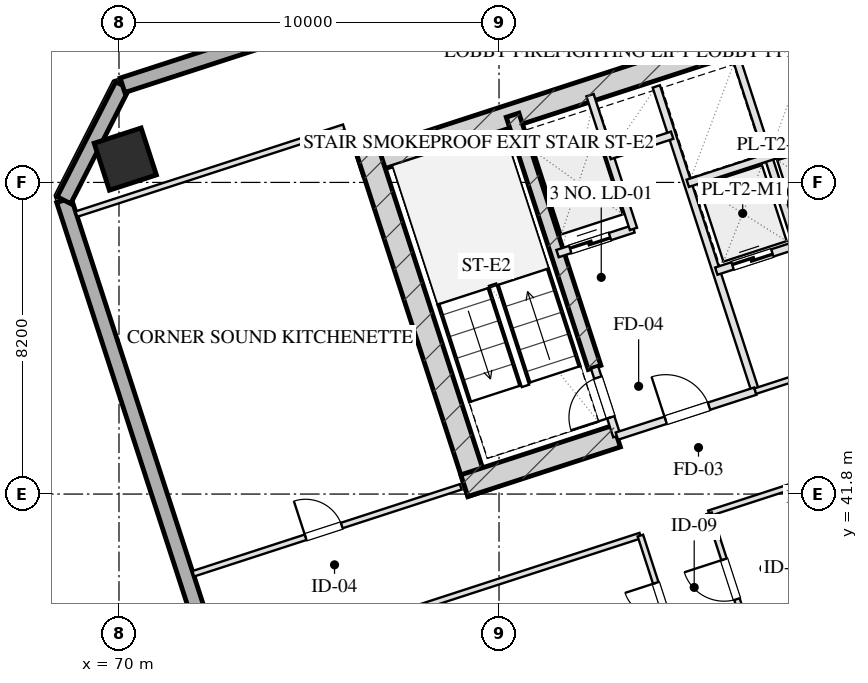
"""IFC4 building model, lengths in metres.
Left out: names, types, materials, properties, quantities, classifications, styles, units other than length and angle.
Written with IfcOpenShell. Run it as: python <this file> out.ifc"""

import sys

from ifc_helpers import new_model, si_unit, direction, frame, frame_2d, origin, origin_2d, place, context, subcontext, project, spatial, rectangle, hollow_rectangle, extrude, element, fill, save


model = new_model("IFC4")
c1 = context("Model", 3, precision=1e-05, world=origin(), true_north=direction((0.0, 1.0)))
c2 = subcontext(c1, "Body", "Model", "MODEL_VIEW")
j1 = project(units=[si_unit("LENGTHUNIT", "METRE"), si_unit("PLANEANGLEUNIT", "RADIAN")], contexts=[c1])
p1 = place(None, origin())
s1 = spatial("IfcSite", under=j1, at=p1, CompositionType="ELEMENT")
p2 = place(p1, origin())
s2 = spatial("IfcBuilding", under=s1, at=p2, CompositionType="ELEMENT")
p3 = place(p2, frame((0.0, 0.0, 180.55)))
s3 = spatial("IfcBuildingStorey", under=s2, at=p3, CompositionType="ELEMENT", Elevation=180.55)
p4 = place(p3, frame((76.344, 50.466, 0.0), z_axis=(0.0, 0.0, 1.0), x_axis=(0.951055727519, 0.309019421968, 0.0)))
e1 = element("IfcWall", 1, at=p4, inside=s3, PredefinedType="SHEAR", context=c2, shape_type="SweptSolid", body=[
    extrude(rectangle(XDim=16.4, YDim=0.6, at=frame_2d((8.2, 0.0))), origin(), (0.0, 0.0, 1.0), 3.45),
])
p5 = place(p3, frame((79.466, 41.828, 0.0), z_axis=(0.0, 0.0, 1.0), x_axis=(-0.309041232772, 0.951048640421, 0.0)))
e2 = element("IfcWall", 2, at=p5, inside=s3, PredefinedType="SHEAR", context=c2, shape_type="SweptSolid", body=[
    extrude(rectangle(XDim=9.48, YDim=0.6, at=frame_2d((4.74, 0.0))), origin(), (0.0, 0.0, 1.0), 3.45),
])
p6 = place(p3, frame((82.514, 45.131, 0.0), z_axis=(0.0, 0.0, 1.0), x_axis=(-0.308988790936, 0.951065679686, 0.0)))
e3 = element("IfcWall", 3, at=p6, inside=s3, PredefinedType="SHEAR", context=c2, shape_type="SweptSolid", body=[
    extrude(rectangle(XDim=6.98, YDim=0.35, at=frame_2d((3.49, 0.0))), origin(), (0.0, 0.0, 1.0), 3.45),
])
p7 = place(p3, frame((79.087, 42.021, 0.0), z_axis=(0.0, 0.0, 1.0), x_axis=(0.951062550203, 0.3089984233, 0.0)))
e4 = element("IfcWall", 4, at=p7, inside=s3, PredefinedType="SHEAR", context=c2, shape_type="SweptSolid", body=[
    extrude(rectangle(XDim=4.22, YDim=0.6, at=frame_2d((2.11, 0.0))), origin(), (0.0, 0.0, 1.0), 3.45),
])
p8 = place(p3, frame((70.165, 50.614, 0.0), z_axis=(0.0, 0.0, 1.0), x_axis=(0.951056516295, 0.309016994375, 0.0)))
e5 = element("IfcColumn", 5, at=p8, inside=s3, PredefinedType="COLUMN", context=c2, shape_type="SweptSolid", body=[
    extrude(hollow_rectangle(XDim=1.3, YDim=1.3, WallThickness=0.045, at=origin_2d()), origin(), (0.0, 0.0, 1.0), 3.451),
])
p9 = place(p3, frame((81.776, 8.827, 0.0), z_axis=(0.0, 0.0, 1.0), x_axis=(-0.309014228706, 0.951057414911, 0.0)))
e6 = element("IfcWall", 6, at=p9, inside=s3, PredefinedType="SOLIDWALL", context=c2, shape_type="SweptSolid", body=[
    extrude(rectangle(XDim=42.8, YDim=0.4, at=frame_2d((21.4, 0.0))), origin(), (0.0, 0.0, 1.0), 2.55),
])
p10 = place(p9, frame((13.95, 0.0, 0.75)))
e7 = element("IfcOpeningElement", 7, at=p10, cuts=e6, PredefinedType="OPENING", context=c2, shape_type="SweptSolid", body=[
    extrude(rectangle(XDim=2.1, YDim=1.4, at=frame_2d((1.05, 0.7))), frame((0.0, 0.21, 0.0), z_axis=(0.0, -1.0, 0.0), x_axis=(1.0, 0.0, 0.0)), (0.0, 0.0, 1.0), 0.42),
])
p11 = place(p9, frame((17.75, 0.0, 0.75)))
e8 = element("IfcOpeningElement", 8, at=p11, cuts=e6, PredefinedType="OPENING", context=c2, shape_type="SweptSolid", body=[
    extrude(rectangle(XDim=2.1, YDim=1.4, at=frame_2d((1.05, 0.7))), frame((0.0, 0.21, 0.0), z_axis=(0.0, -1.0, 0.0), x_axis=(1.0, 0.0, 0.0)), (0.0, 0.0, 1.0), 0.42),
])
p12 = place(p9, frame((22.95, 0.0, 0.75)))
e9 = element("IfcOpeningElement", 9, at=p12, cuts=e6, PredefinedType="OPENING", context=c2, shape_type="SweptSolid", body=[
    extrude(rectangle(XDim=2.1, YDim=1.4, at=frame_2d((1.05, 0.7))), frame((0.0, 0.21, 0.0), z_axis=(0.0, -1.0, 0.0), x_axis=(1.0, 0.0, 0.0)), (0.0, 0.0, 1.0), 0.42),
])
p13 = place(p9, frame((26.75, 0.0, 0.75)))
e10 = element("IfcOpeningElement", 10, at=p13, cuts=e6, PredefinedType="OPENING", context=c2, shape_type="SweptSolid", body=[
    extrude(rectangle(XDim=2.1, YDim=1.4, at=frame_2d((1.05, 0.7))), frame((0.0, 0.21, 0.0), z_axis=(0.0, -1.0, 0.0), x_axis=(1.0, 0.0, 0.0)), (0.0, 0.0, 1.0), 0.42),
])
p14 = place(p3, frame((68.551, 49.532, 0.0), z_axis=(0.0, 0.0, 1.0), x_axis=(0.454019523198, 0.890991735402, 0.0)))
e11 = element("IfcWall", 11, at=p14, inside=s3, PredefinedType="SOLIDWALL", context=c2, shape_type="SweptSolid", body=[
    extrude(rectangle(XDim=3.394, YDim=0.4, at=frame_2d((1.697, 0.0))), origin(), (0.0, 0.0, 1.0), 2.55),
])
p15 = place(p3, frame((70.092, 52.556, 0.0), z_axis=(0.0, 0.0, 1.0), x_axis=(0.951057580055, 0.30901372044, 0.0)))
e12 = element("IfcWall", 12, at=p15, inside=s3, PredefinedType="SOLIDWALL", context=c2, shape_type="SweptSolid", body=[
    extrude(rectangle(XDim=26.4, YDim=0.4, at=frame_2d((13.2, 0.0))), origin(), (0.0, 0.0, 1.0), 2.55),
])
p16 = place(p3, frame((83.101, 43.324, 0.0), z_axis=(0.0, 0.0, 1.0), x_axis=(-0.309048298632, 0.951046344356, 0.0)))
e13 = element("IfcWall", 13, at=p16, inside=s3, PredefinedType="PARTITIONING", context=c2, shape_type="SweptSolid", body=[
    extrude(rectangle(XDim=1.9, YDim=0.2, at=frame_2d((0.95, 0.0))), origin(), (0.0, 0.0, 1.0), 3.155),
])
p17 = place(p16, frame((0.52, 0.0, 0.0)))
e14 = element("IfcOpeningElement", 14, at=p17, cuts=e13, PredefinedType="OPENING", context=c2, shape_type="SweptSolid", body=[
    extrude(rectangle(XDim=1.1, YDim=2.05, at=frame_2d((0.55, 1.025))), frame((0.0, 0.11, 0.0), z_axis=(0.0, -1.0, 0.0), x_axis=(1.0, 0.0, 0.0)), (0.0, 0.0, 1.0), 0.22),
])
p18 = place(p3, frame((86.743, 44.508, 0.0), z_axis=(0.0, 0.0, 1.0), x_axis=(-0.309016001439, 0.951056838919, 0.0)))
e15 = element("IfcWall", 15, at=p18, inside=s3, PredefinedType="PARTITIONING", context=c2, shape_type="SweptSolid", body=[
    extrude(rectangle(XDim=8.43, YDim=0.2, at=frame_2d((4.215, 0.0))), origin(), (0.0, 0.0, 1.0), 3.155),
])
p19 = place(p3, frame((83.101, 43.324, 0.0), z_axis=(0.0, 0.0, 1.0), x_axis=(0.951052804469, 0.309028417967, 0.0)))
e16 = element("IfcWall", 16, at=p19, inside=s3, PredefinedType="PARTITIONING", context=c2, shape_type="SweptSolid", body=[
    extrude(rectangle(XDim=3.83, YDim=0.2, at=frame_2d((1.915, 0.0))), origin(), (0.0, 0.0, 1.0), 3.155),
])
p20 = place(p19, frame((1.35, 0.0, 0.0)))
e17 = element("IfcOpeningElement", 17, at=p20, cuts=e16, PredefinedType="OPENING", context=c2, shape_type="SweptSolid", body=[
    extrude(rectangle(XDim=1.2, YDim=2.05, at=frame_2d((0.6, 1.025))), frame((0.0, 0.11, 0.0), z_axis=(0.0, -1.0, 0.0), x_axis=(1.0, 0.0, 0.0)), (0.0, 0.0, 1.0), 0.22),
])
p21 = place(p3, frame((81.54, 48.127, 0.0), z_axis=(0.0, 0.0, 1.0), x_axis=(0.951062257173, 0.308999325213, 0.0)))
e18 = element("IfcWall", 18, at=p21, inside=s3, PredefinedType="PARTITIONING", context=c2, shape_type="SweptSolid", body=[
    extrude(rectangle(XDim=2.1, YDim=0.2, at=frame_2d((1.05, 0.0))), origin(), (0.0, 0.0, 1.0), 3.155),
])
p22 = place(p21, frame((0.35, 0.0, 0.0)))
e19 = element("IfcOpeningElement", 19, at=p22, cuts=e18, PredefinedType="OPENING", context=c2, shape_type="SweptSolid", body=[
    extrude(rectangle(XDim=1.1, YDim=2.05, at=frame_2d((0.55, 1.025))), frame((0.0, 0.11, 0.0), z_axis=(0.0, -1.0, 0.0), x_axis=(1.0, 0.0, 0.0)), (0.0, 0.0, 1.0), 0.22),
])
p23 = place(p3, frame((83.538, 48.776, 0.0), z_axis=(0.0, 0.0, 1.0), x_axis=(-0.3089935693, 0.951064127245, 0.0)))
e20 = element("IfcWall", 20, at=p23, inside=s3, PredefinedType="PARTITIONING", context=c2, shape_type="SweptSolid", body=[
    extrude(rectangle(XDim=3.7, YDim=0.2, at=frame_2d((1.85, 0.0))), origin(), (0.0, 0.0, 1.0), 3.155),
])
p24 = place(p3, frame((82.91, 50.707, 0.0), z_axis=(0.0, 0.0, 1.0), x_axis=(0.951041328149, 0.309063734775, 0.0)))
e21 = element("IfcWall", 21, at=p24, inside=s3, PredefinedType="PARTITIONING", context=c2, shape_type="SweptSolid", body=[
    extrude(rectangle(XDim=1.73, YDim=0.2, at=frame_2d((0.865, 0.0))), origin(), (0.0, 0.0, 1.0), 3.155),
])
p25 = place(p3, frame((86.743, 44.508, 0.0), z_axis=(0.0, 0.0, 1.0), x_axis=(0.951063829732, 0.308994485023, 0.0)))
e22 = element("IfcWall", 22, at=p25, inside=s3, PredefinedType="PARTITIONING", context=c2, shape_type="SweptSolid", body=[
    extrude(rectangle(XDim=4.4, YDim=0.15, at=frame_2d((2.2, 0.0))), origin(), (0.0, 0.0, 1.0), 3.155),
])
p26 = place(p25, frame((1.45, 0.0, 0.0)))
e23 = element("IfcOpeningElement", 23, at=p26, cuts=e22, PredefinedType="OPENING", context=c2, shape_type="SweptSolid", body=[
    extrude(rectangle(XDim=1.5, YDim=2.05, at=frame_2d((0.75, 1.025))), frame((0.0, 0.085, 0.0), z_axis=(0.0, -1.0, 0.0), x_axis=(1.0, 0.0, 0.0)), (0.0, 0.0, 1.0), 0.17),
])
p27 = place(p3, frame((85.718, 47.666, 0.0), z_axis=(0.0, 0.0, 1.0), x_axis=(0.951058531764, 0.30901079133, 0.0)))
e24 = element("IfcWall", 24, at=p27, inside=s3, PredefinedType="PARTITIONING", context=c2, shape_type="SweptSolid", body=[
    extrude(rectangle(XDim=4.4, YDim=0.2, at=frame_2d((2.2, 0.0))), origin(), (0.0, 0.0, 1.0), 3.155),
])
p28 = place(p27, frame((0.45, 0.0, 0.0)))
e25 = element("IfcOpeningElement", 25, at=p28, cuts=e24, PredefinedType="OPENING", context=c2, shape_type="SweptSolid", body=[
    extrude(rectangle(XDim=1.1, YDim=2.05, at=frame_2d((0.55, 1.025))), frame((0.0, 0.11, 0.0), z_axis=(0.0, -1.0, 0.0), x_axis=(1.0, 0.0, 0.0)), (0.0, 0.0, 1.0), 0.22),
])
p29 = place(p27, frame((2.55, 0.0, 0.0)))
e26 = element("IfcOpeningElement", 26, at=p29, cuts=e24, PredefinedType="OPENING", context=c2, shape_type="SweptSolid", body=[
    extrude(rectangle(XDim=1.1, YDim=2.05, at=frame_2d((0.55, 1.025))), frame((0.0, 0.11, 0.0), z_axis=(0.0, -1.0, 0.0), x_axis=(1.0, 0.0, 0.0)), (0.0, 0.0, 1.0), 0.22),
])
p30 = place(p3, frame((87.838, 48.354, 0.0), z_axis=(0.0, 0.0, 1.0), x_axis=(-0.3090093719, 0.951058992953, 0.0)))
e27 = element("IfcWall", 27, at=p30, inside=s3, PredefinedType="PARTITIONING", context=c2, shape_type="SweptSolid", body=[
    extrude(rectangle(XDim=5.11, YDim=0.2, at=frame_2d((2.555, 0.0))), origin(), (0.0, 0.0, 1.0), 3.155),
])
p31 = place(p3, frame((84.967, 49.977, 0.0), z_axis=(0.0, 0.0, 1.0), x_axis=(0.951063829732, 0.308994485023, 0.0)))
e28 = element("IfcWall", 28, at=p31, inside=s3, PredefinedType="PARTITIONING", context=c2, shape_type="SweptSolid", body=[
    extrude(rectangle(XDim=4.4, YDim=0.2, at=frame_2d((2.2, 0.0))), origin(), (0.0, 0.0, 1.0), 3.155),
])
p32 = place(p3, frame((68.88, 49.166, 0.0), z_axis=(0.0, 0.0, 1.0), x_axis=(0.951060977215, 0.309003264738, 0.0)))
e29 = element("IfcWall", 29, at=p32, inside=s3, PredefinedType="PARTITIONING", context=c2, shape_type="SweptSolid", body=[
    extrude(rectangle(XDim=7.4, YDim=0.15, at=frame_2d((3.7, 0.0))), origin(), (0.0, 0.0, 1.0), 3.155),
])
p33 = place(p3, frame((71.955, 39.703, 0.0), z_axis=(0.0, 0.0, 1.0), x_axis=(0.951060977215, 0.309003264738, 0.0)))
e30 = element("IfcWall", 30, at=p33, inside=s3, PredefinedType="PARTITIONING", context=c2, shape_type="SweptSolid", body=[
    extrude(rectangle(XDim=7.4, YDim=0.15, at=frame_2d((3.7, 0.0))), origin(), (0.0, 0.0, 1.0), 3.155),
])
p34 = place(p33, frame((3.108, 0.0, 0.0)))
e31 = element("IfcOpeningElement", 31, at=p34, cuts=e30, PredefinedType="OPENING", context=c2, shape_type="SweptSolid", body=[
    extrude(rectangle(XDim=1.0, YDim=2.05, at=frame_2d((0.5, 1.025))), frame((0.0, 0.085, 0.0), z_axis=(0.0, -1.0, 0.0), x_axis=(1.0, 0.0, 0.0)), (0.0, 0.0, 1.0), 0.17),
])
p35 = place(p3, frame((72.783, 37.154, 0.0), z_axis=(0.0, 0.0, 1.0), x_axis=(0.951056999652, 0.309015506751, 0.0)))
e32 = element("IfcWall", 32, at=p35, inside=s3, PredefinedType="PARTITIONING", context=c2, shape_type="SweptSolid", body=[
    extrude(rectangle(XDim=11.5, YDim=0.15, at=frame_2d((5.75, 0.0))), origin(), (0.0, 0.0, 1.0), 3.155),
])
p36 = place(p3, frame((85.527, 41.295, 0.0), z_axis=(0.0, 0.0, 1.0), x_axis=(0.951055419664, 0.309020369437, 0.0)))
e33 = element("IfcWall", 33, at=p36, inside=s3, PredefinedType="PARTITIONING", context=c2, shape_type="SweptSolid", body=[
    extrude(rectangle(XDim=8.15, YDim=0.15, at=frame_2d((4.075, 0.0))), origin(), (0.0, 0.0, 1.0), 3.155),
])
p37 = place(p3, frame((88.862, 24.882, 0.0), z_axis=(0.0, 0.0, 1.0), x_axis=(-0.309008771245, 0.951059188113, 0.0)))
e34 = element("IfcWall", 34, at=p37, inside=s3, PredefinedType="PARTITIONING", context=c2, shape_type="SweptSolid", body=[
    extrude(rectangle(XDim=16.64, YDim=0.15, at=frame_2d((8.32, 0.0))), origin(), (0.0, 0.0, 1.0), 3.155),
])
p38 = place(p37, frame((1.16, 0.0, 0.0)))
e35 = element("IfcOpeningElement", 35, at=p38, cuts=e34, PredefinedType="OPENING", context=c2, shape_type="SweptSolid", body=[
    extrude(rectangle(XDim=1.0, YDim=2.05, at=frame_2d((0.5, 1.025))), frame((0.0, 0.085, 0.0), z_axis=(0.0, -1.0, 0.0), x_axis=(1.0, 0.0, 0.0)), (0.0, 0.0, 1.0), 0.17),
])
p39 = place(p37, frame((5.48, 0.0, 0.0)))
e36 = element("IfcOpeningElement", 36, at=p39, cuts=e34, PredefinedType="OPENING", context=c2, shape_type="SweptSolid", body=[
    extrude(rectangle(XDim=1.05, YDim=2.05, at=frame_2d((0.525, 1.025))), frame((0.0, 0.085, 0.0), z_axis=(0.0, -1.0, 0.0), x_axis=(1.0, 0.0, 0.0)), (0.0, 0.0, 1.0), 0.17),
])
p40 = place(p37, frame((8.08, 0.0, 0.0)))
e37 = element("IfcOpeningElement", 37, at=p40, cuts=e34, PredefinedType="OPENING", context=c2, shape_type="SweptSolid", body=[
    extrude(rectangle(XDim=1.0, YDim=2.05, at=frame_2d((0.5, 1.025))), frame((0.0, 0.085, 0.0), z_axis=(0.0, -1.0, 0.0), x_axis=(1.0, 0.0, 0.0)), (0.0, 0.0, 1.0), 0.17),
])
p41 = place(p37, frame((10.92, 0.0, 0.0)))
e38 = element("IfcOpeningElement", 38, at=p41, cuts=e34, PredefinedType="OPENING", context=c2, shape_type="SweptSolid", body=[
    extrude(rectangle(XDim=1.0, YDim=2.05, at=frame_2d((0.5, 1.025))), frame((0.0, 0.085, 0.0), z_axis=(0.0, -1.0, 0.0), x_axis=(1.0, 0.0, 0.0)), (0.0, 0.0, 1.0), 0.17),
])
p42 = place(p37, frame((14.48, 0.0, 0.0)))
e39 = element("IfcOpeningElement", 39, at=p42, cuts=e34, PredefinedType="OPENING", context=c2, shape_type="SweptSolid", body=[
    extrude(rectangle(XDim=0.85, YDim=2.05, at=frame_2d((0.425, 1.025))), frame((0.0, 0.085, 0.0), z_axis=(0.0, -1.0, 0.0), x_axis=(1.0, 0.0, 0.0)), (0.0, 0.0, 1.0), 0.17),
])
p43 = place(p3, frame((90.669, 25.469, 0.0), z_axis=(0.0, 0.0, 1.0), x_axis=(-0.309022042254, 0.951054876125, 0.0)))
e40 = element("IfcWall", 40, at=p43, inside=s3, PredefinedType="PARTITIONING", context=c2, shape_type="SweptSolid", body=[
    extrude(rectangle(XDim=16.64, YDim=0.15, at=frame_2d((8.32, 0.0))), origin(), (0.0, 0.0, 1.0), 3.155),
])
p44 = place(p43, frame((1.944, 0.0, 0.0)))
e41 = element("IfcOpeningElement", 41, at=p44, cuts=e40, PredefinedType="OPENING", context=c2, shape_type="SweptSolid", body=[
    extrude(rectangle(XDim=1.1, YDim=2.05, at=frame_2d((0.55, 1.025))), frame((0.0, 0.085, 0.0), z_axis=(0.0, -1.0, 0.0), x_axis=(1.0, 0.0, 0.0)), (0.0, 0.0, 1.0), 0.17),
])
p45 = place(p43, frame((14.264, 0.0, 0.0)))
e42 = element("IfcOpeningElement", 42, at=p45, cuts=e40, PredefinedType="OPENING", context=c2, shape_type="SweptSolid", body=[
    extrude(rectangle(XDim=1.1, YDim=2.05, at=frame_2d((0.55, 1.025))), frame((0.0, 0.085, 0.0), z_axis=(0.0, -1.0, 0.0), x_axis=(1.0, 0.0, 0.0)), (0.0, 0.0, 1.0), 0.17),
])
p46 = place(p3, frame((86.862, 37.186, 0.0), z_axis=(0.0, 0.0, 1.0), x_axis=(0.95106422313, 0.308993274169, 0.0)))
e43 = element("IfcWall", 43, at=p46, inside=s3, PredefinedType="PARTITIONING", context=c2, shape_type="SweptSolid", body=[
    extrude(rectangle(XDim=8.15, YDim=0.15, at=frame_2d((4.075, 0.0))), origin(), (0.0, 0.0, 1.0), 3.155),
])
p47 = place(p17, origin())
e44 = element("IfcDoor", 44, at=p47, inside=s3, OperationType="SINGLE_SWING_LEFT", PredefinedType="DOOR", context=c2, shape_type="SweptSolid", body=[
    extrude(rectangle(XDim=1.1, YDim=2.05, at=frame_2d((0.55, 1.025))), frame((0.0, 0.025, 0.0), z_axis=(0.0, -1.0, 0.0), x_axis=(1.0, 0.0, 0.0)), (0.0, 0.0, 1.0), 0.05),
])
fill(e14, e44)
p48 = place(p20, origin())
e45 = element("IfcDoor", 45, at=p48, inside=s3, OperationType="SINGLE_SWING_LEFT", PredefinedType="DOOR", context=c2, shape_type="SweptSolid", body=[
    extrude(rectangle(XDim=1.2, YDim=2.05, at=frame_2d((0.6, 1.025))), frame((0.0, 0.025, 0.0), z_axis=(0.0, -1.0, 0.0), x_axis=(1.0, 0.0, 0.0)), (0.0, 0.0, 1.0), 0.05),
])
fill(e17, e45)
p49 = place(p22, origin())
e46 = element("IfcDoor", 46, at=p49, inside=s3, OperationType="DOUBLE_DOOR_SLIDING", PredefinedType="DOOR", context=c2, shape_type="SweptSolid", body=[
    extrude(rectangle(XDim=1.1, YDim=2.05, at=frame_2d((0.55, 1.025))), frame((0.0, 0.025, 0.0), z_axis=(0.0, -1.0, 0.0), x_axis=(1.0, 0.0, 0.0)), (0.0, 0.0, 1.0), 0.05),
])
fill(e19, e46)
p50 = place(p28, origin())
e47 = element("IfcDoor", 47, at=p50, inside=s3, OperationType="DOUBLE_DOOR_SLIDING", PredefinedType="DOOR", context=c2, shape_type="SweptSolid", body=[
    extrude(rectangle(XDim=1.1, YDim=2.05, at=frame_2d((0.55, 1.025))), frame((0.0, 0.025, 0.0), z_axis=(0.0, -1.0, 0.0), x_axis=(1.0, 0.0, 0.0)), (0.0, 0.0, 1.0), 0.05),
])
fill(e25, e47)
p51 = place(p34, origin())
e48 = element("IfcDoor", 48, at=p51, inside=s3, OperationType="SINGLE_SWING_LEFT", PredefinedType="DOOR", context=c2, shape_type="SweptSolid", body=[
    extrude(rectangle(XDim=1.0, YDim=2.05, at=frame_2d((0.5, 1.025))), frame((0.0, 0.025, 0.0), z_axis=(0.0, -1.0, 0.0), x_axis=(1.0, 0.0, 0.0)), (0.0, 0.0, 1.0), 0.05),
])
fill(e31, e48)
p52 = place(p42, origin())
e49 = element("IfcDoor", 49, at=p52, inside=s3, OperationType="SINGLE_SWING_RIGHT", PredefinedType="DOOR", context=c2, shape_type="SweptSolid", body=[
    extrude(rectangle(XDim=0.85, YDim=2.05, at=frame_2d((0.425, 1.025))), frame((0.0, 0.025, 0.0), z_axis=(0.0, -1.0, 0.0), x_axis=(1.0, 0.0, 0.0)), (0.0, 0.0, 1.0), 0.05),
])
fill(e39, e49)
p53 = place(p45, origin())
e50 = element("IfcDoor", 50, at=p53, inside=s3, OperationType="SINGLE_SWING_RIGHT", PredefinedType="DOOR", context=c2, shape_type="SweptSolid", body=[
    extrude(rectangle(XDim=1.1, YDim=2.05, at=frame_2d((0.55, 1.025))), frame((0.0, 0.025, 0.0), z_axis=(0.0, -1.0, 0.0), x_axis=(1.0, 0.0, 0.0)), (0.0, 0.0, 1.0), 0.05),
])
fill(e42, e50)
save(model, sys.argv[1])
